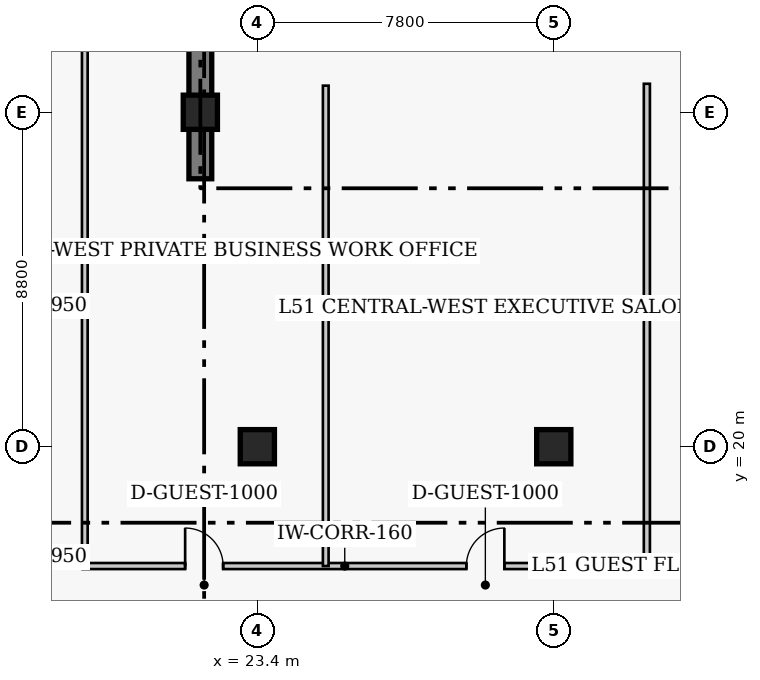
"""IFC4 building model, lengths in metres.
Left out: names, types, materials, properties, quantities, classifications, styles, units other than length and angle.
Written with IfcOpenShell. Run it as: python <this file> out.ifc"""

import sys

from ifc_helpers import new_model, si_unit, direction, frame, frame_2d, origin, origin_2d, place, context, subcontext, project, spatial, rectangle, extrude, element, fill, save


model = new_model("IFC4")
c1 = context("Model", 3, precision=1e-05, world=origin(), true_north=direction((0.0, 1.0)))
c2 = subcontext(c1, "Body", "Model", "MODEL_VIEW")
j1 = project(units=[si_unit("LENGTHUNIT", "METRE"), si_unit("PLANEANGLEUNIT", "RADIAN")], contexts=[c1])
p1 = place(None, origin())
s1 = spatial("IfcSite", under=j1, at=p1, CompositionType="ELEMENT")
p2 = place(p1, origin())
s2 = spatial("IfcBuilding", under=s1, at=p2, CompositionType="ELEMENT")
p3 = place(p2, frame((0.0, 0.0, 204.6)))
s3 = spatial("IfcBuildingStorey", under=s2, at=p3, CompositionType="ELEMENT", Elevation=204.6)
p4 = place(p3, frame((21.9, 27.05, 0.0), z_axis=(0.0, 0.0, 1.0), x_axis=(0.0, 1.0, 0.0)))
e1 = element("IfcWall", 1, at=p4, inside=s3, PredefinedType="SHEAR", context=c2, shape_type="SweptSolid", body=[
    extrude(rectangle(XDim=13.57, YDim=0.6, at=frame_2d((6.785, 0.0))), origin(), (0.0, 0.0, 1.0), 3.9),
])
for number, where, z_axis, x_axis in (
    (2, (23.4, 20.0, 0.0), (0.0, 0.0, 1.0), (1.0, 0.0, 0.0)),
    (3, (31.2, 20.0, 0.0), (0.0, 0.0, 1.0), (1.0, 0.0, 0.0)),
    (4, (21.9, 28.8, 0.0), (0.0, 0.0, 1.0), (1.0, 0.0, 0.0)),
):
    element("IfcColumn", number, at=place(p3, frame(where, z_axis=z_axis, x_axis=x_axis)), inside=s3, PredefinedType="COLUMN", context=c2, shape_type="SweptSolid", body=[
        extrude(rectangle(XDim=0.9, YDim=0.9, at=origin_2d()), origin(), (0.0, 0.0, 1.0), 3.9),
    ])
p5 = place(p3, frame((18.8, 16.86, 0.0), z_axis=(0.0, 0.0, 1.0), x_axis=(1.0, 0.0, 0.0)))
e5 = element("IfcWall", 5, at=p5, inside=s3, PredefinedType="PARTITIONING", context=c2, shape_type="SweptSolid", body=[
    extrude(rectangle(XDim=14.85, YDim=0.16, at=frame_2d((7.425, 0.0))), origin(), (0.0, 0.0, 1.0), 3.65),
])
p6 = place(p5, frame((2.7, 0.0, 0.0)))
e6 = element("IfcOpeningElement", 6, at=p6, cuts=e5, PredefinedType="OPENING", context=c2, shape_type="SweptSolid", body=[
    extrude(rectangle(XDim=1.0, YDim=2.15, at=frame_2d((0.5, 1.075))), frame((0.0, 0.09, 0.0), z_axis=(0.0, -1.0, 0.0), x_axis=(1.0, 0.0, 0.0)), (0.0, 0.0, 1.0), 0.18),
])
p7 = place(p5, frame((10.1, 0.0, 0.0)))
e7 = element("IfcOpeningElement", 7, at=p7, cuts=e5, PredefinedType="OPENING", context=c2, shape_type="SweptSolid", body=[
    extrude(rectangle(XDim=1.0, YDim=2.15, at=frame_2d((0.5, 1.075))), frame((0.0, 0.09, 0.0), z_axis=(0.0, -1.0, 0.0), x_axis=(1.0, 0.0, 0.0)), (0.0, 0.0, 1.0), 0.18),
])
p8 = place(p3, frame((33.65, 16.86, 0.0), z_axis=(0.0, 0.0, 1.0), x_axis=(0.0, 1.0, 0.0)))
e8 = element("IfcWall", 8, at=p8, inside=s3, PredefinedType="PARTITIONING", context=c2, shape_type="SweptSolid", body=[
    extrude(rectangle(XDim=12.69, YDim=0.16, at=frame_2d((6.345, 0.0))), origin(), (0.0, 0.0, 1.0), 3.65),
])
p9 = place(p3, frame((18.86, 16.86, 0.0), z_axis=(0.0, 0.0, 1.0), x_axis=(0.0, 1.0, 0.0)))
e9 = element("IfcWall", 9, at=p9, inside=s3, PredefinedType="PARTITIONING", context=c2, shape_type="SweptSolid", body=[
    extrude(rectangle(XDim=15.94, YDim=0.15, at=frame_2d((7.97, 0.0))), origin(), (0.0, 0.0, 1.0), 3.65),
])
p10 = place(p3, frame((25.2, 16.86, 0.0), z_axis=(0.0, 0.0, 1.0), x_axis=(0.0, 1.0, 0.0)))
e10 = element("IfcWall", 10, at=p10, inside=s3, PredefinedType="PARTITIONING", context=c2, shape_type="SweptSolid", body=[
    extrude(rectangle(XDim=12.64, YDim=0.15, at=frame_2d((6.32, 0.0))), origin(), (0.0, 0.0, 1.0), 3.65),
])
p11 = place(p6, origin())
e11 = element("IfcDoor", 11, at=p11, inside=s3, OperationType="SINGLE_SWING_LEFT", PredefinedType="DOOR", context=c2, shape_type="SweptSolid", body=[
    extrude(rectangle(XDim=1.0, YDim=2.15, at=frame_2d((0.5, 1.075))), frame((0.0, 0.025, 0.0), z_axis=(0.0, -1.0, 0.0), x_axis=(1.0, 0.0, 0.0)), (0.0, 0.0, 1.0), 0.05),
])
fill(e6, e11)
p12 = place(p7, origin())
e12 = element("IfcDoor", 12, at=p12, inside=s3, OperationType="SINGLE_SWING_RIGHT", PredefinedType="DOOR", context=c2, shape_type="SweptSolid", body=[
    extrude(rectangle(XDim=1.0, YDim=2.15, at=frame_2d((0.5, 1.075))), frame((0.0, 0.025, 0.0), z_axis=(0.0, -1.0, 0.0), x_axis=(1.0, 0.0, 0.0)), (0.0, 0.0, 1.0), 0.05),
])
fill(e7, e12)
save(model, sys.argv[1])
